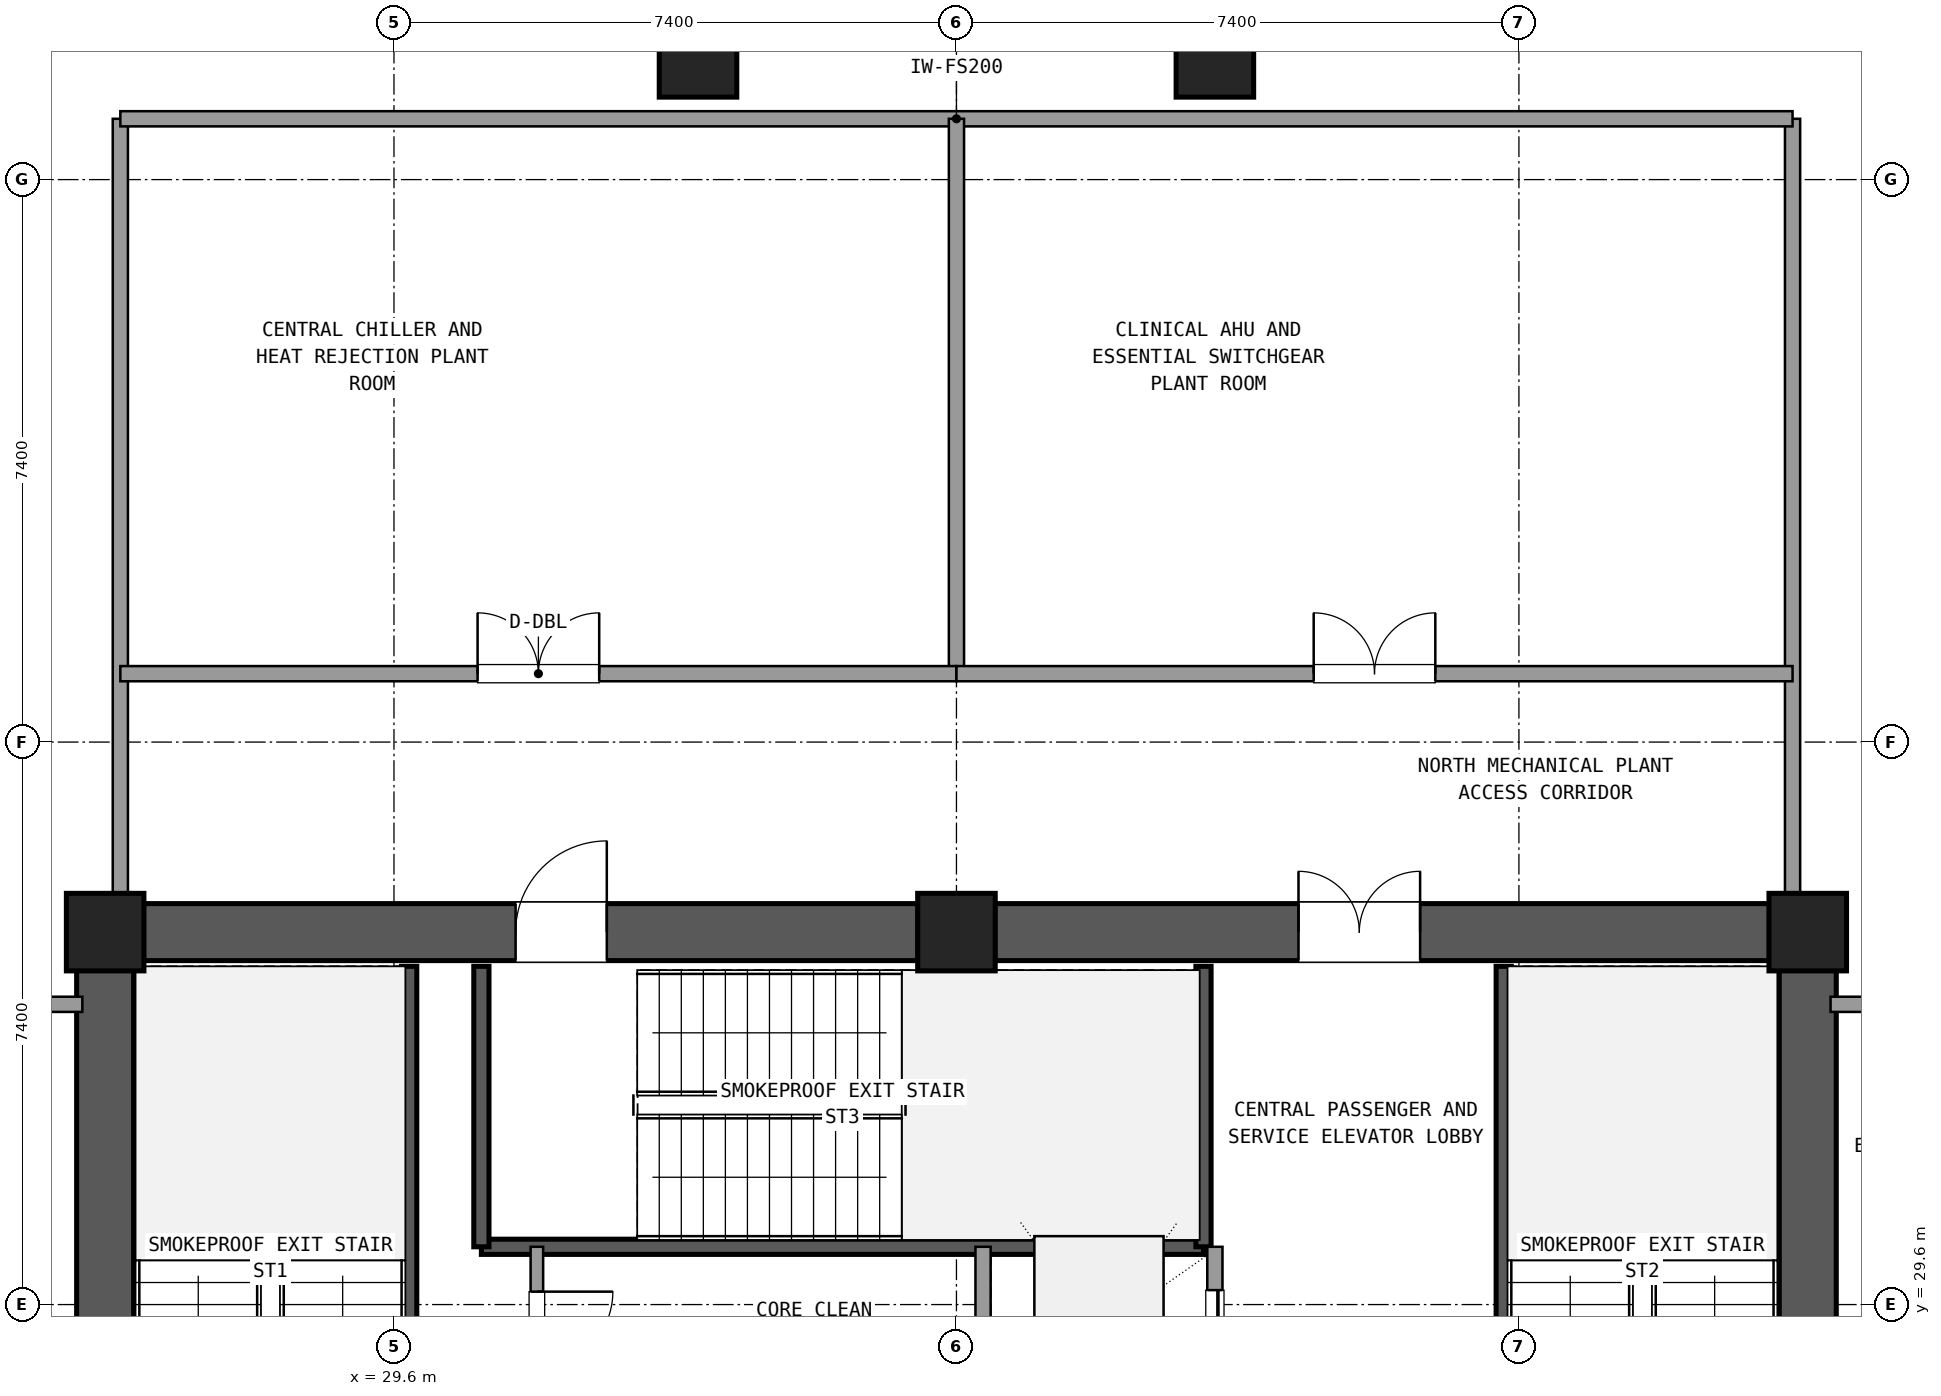
"""IFC4 building model, lengths in metres.
Left out: names, types, materials, properties, quantities, classifications, styles, units other than length and angle.
Written with IfcOpenShell. Run it as: python <this file> out.ifc"""

import sys

from ifc_helpers import new_model, si_unit, direction, frame, frame_2d, origin, origin_2d, place, context, subcontext, project, spatial, rectangle, extrude, element, fill, save


model = new_model("IFC4")
c1 = context("Model", 3, precision=1e-05, world=origin(), true_north=direction((0.0, 1.0)))
c2 = subcontext(c1, "Body", "Model", "MODEL_VIEW")
j1 = project(units=[si_unit("LENGTHUNIT", "METRE"), si_unit("PLANEANGLEUNIT", "RADIAN")], contexts=[c1])
p1 = place(None, origin())
s1 = spatial("IfcSite", under=j1, at=p1, CompositionType="ELEMENT")
p2 = place(p1, origin())
s2 = spatial("IfcBuilding", under=s1, at=p2, CompositionType="ELEMENT")
p3 = place(p2, frame((0.0, 0.0, 124.38)))
s3 = spatial("IfcBuildingStorey", under=s2, at=p3, CompositionType="ELEMENT", Elevation=124.38)
for number, where, z_axis, x_axis in (
    (1, (48.2, 34.5, 0.0), (0.0, 0.0, 1.0), (1.0, 0.0, 0.0)),
    (2, (37.0, 34.5, 0.0), (0.0, 0.0, 1.0), (1.0, 0.0, 0.0)),
    (3, (25.8, 34.5, 0.0), (0.0, 0.0, 1.0), (1.0, 0.0, 0.0)),
):
    element("IfcColumn", number, at=place(p3, frame(where, z_axis=z_axis, x_axis=x_axis)), inside=s3, PredefinedType="COLUMN", context=c2, shape_type="SweptSolid", body=[
        extrude(rectangle(XDim=1.02, YDim=1.02, at=origin_2d()), origin(), (0.0, 0.0, 1.0), 4.68),
    ])
p4 = place(p3, frame((48.2, 26.405, 0.0), z_axis=(0.0, 0.0, 1.0), x_axis=(0.0, 1.0, 0.0)))
e4 = element("IfcWall", 4, at=p4, inside=s3, PredefinedType="SHEAR", context=c2, shape_type="SweptSolid", body=[
    extrude(rectangle(XDim=7.59, YDim=0.75, at=frame_2d((3.795, 0.0))), origin(), (0.0, 0.0, 1.0), 4.38),
])
p5 = place(p3, frame((47.695, 34.5, 0.0), z_axis=(0.0, 0.0, 1.0), x_axis=(-1.0, 0.0, 0.0)))
e5 = element("IfcWall", 5, at=p5, inside=s3, PredefinedType="SHEAR", context=c2, shape_type="SweptSolid", body=[
    extrude(rectangle(XDim=10.19, YDim=0.75, at=frame_2d((5.095, 0.0))), origin(), (0.0, 0.0, 1.0), 4.38),
])
p6 = place(p5, frame((4.595, 0.0, 0.0)))
e6 = element("IfcOpeningElement", 6, at=p6, cuts=e5, PredefinedType="OPENING", context=c2, shape_type="SweptSolid", body=[
    extrude(rectangle(XDim=1.6, YDim=2.2, at=frame_2d((0.8, 1.1))), frame((0.0, 0.385, 0.0), z_axis=(0.0, -1.0, 0.0), x_axis=(1.0, 0.0, 0.0)), (0.0, 0.0, 1.0), 0.77),
])
p7 = place(p3, frame((36.495, 34.5, 0.0), z_axis=(0.0, 0.0, 1.0), x_axis=(-1.0, 0.0, 0.0)))
e7 = element("IfcWall", 7, at=p7, inside=s3, PredefinedType="SHEAR", context=c2, shape_type="SweptSolid", body=[
    extrude(rectangle(XDim=10.19, YDim=0.75, at=frame_2d((5.095, 0.0))), origin(), (0.0, 0.0, 1.0), 4.38),
])
p8 = place(p7, frame((4.095, 0.0, 0.0)))
e8 = element("IfcOpeningElement", 8, at=p8, cuts=e7, PredefinedType="OPENING", context=c2, shape_type="SweptSolid", body=[
    extrude(rectangle(XDim=1.2, YDim=2.15, at=frame_2d((0.6, 1.075))), frame((0.0, 0.385, 0.0), z_axis=(0.0, -1.0, 0.0), x_axis=(1.0, 0.0, 0.0)), (0.0, 0.0, 1.0), 0.77),
])
p9 = place(p3, frame((25.8, 33.995, 0.0), z_axis=(0.0, 0.0, 1.0), x_axis=(0.0, -1.0, 0.0)))
e9 = element("IfcWall", 9, at=p9, inside=s3, PredefinedType="SHEAR", context=c2, shape_type="SweptSolid", body=[
    extrude(rectangle(XDim=7.59, YDim=0.75, at=frame_2d((3.795, 0.0))), origin(), (0.0, 0.0, 1.0), 4.38),
])
for number, where, z_axis, x_axis in (
    (10, (40.4, 45.995, 0.021), (0.0, -0.025, 1.0), (1.0, 0.0, 0.0)),
    (11, (33.6, 45.995, 0.021), (0.0, -0.025, 1.0), (1.0, 0.0, 0.0)),
):
    element("IfcColumn", number, at=place(p3, frame(where, z_axis=z_axis, x_axis=x_axis)), inside=s3, PredefinedType="COLUMN", context=c2, shape_type="SweptSolid", body=[
        extrude(rectangle(XDim=1.02, YDim=1.02, at=origin_2d()), origin(), (0.0, 0.0, 1.0), 4.64),
    ])
for number, where, z_axis, x_axis in (
    (12, (29.8, 24.65, 0.0), (0.0, 0.0, 1.0), (0.0, 1.0, 0.0)),
    (13, (44.2, 24.65, 0.0), (0.0, 0.0, 1.0), (0.0, 1.0, 0.0)),
):
    element("IfcWall", number, at=place(p3, frame(where, z_axis=z_axis, x_axis=x_axis)), inside=s3, PredefinedType="SHEAR", context=c2, shape_type="SweptSolid", body=[
        extrude(rectangle(XDim=9.4, YDim=0.2, at=frame_2d((4.7, 0.0))), origin(), (0.0, 0.0, 1.0), 4.38),
    ])
p10 = place(p3, frame((30.75, 30.36, 0.0), z_axis=(0.0, 0.0, 1.0), x_axis=(1.0, 0.0, 0.0)))
e14 = element("IfcWall", 14, at=p10, inside=s3, PredefinedType="SHEAR", context=c2, shape_type="SweptSolid", body=[
    extrude(rectangle(XDim=9.5, YDim=0.2, at=frame_2d((4.75, 0.0))), origin(), (0.0, 0.0, 1.0), 4.38),
])
for number, where, z_axis, x_axis in (
    (15, (30.75, 30.36, 0.0), (0.0, 0.0, 1.0), (0.0, 1.0, 0.0)),
    (16, (40.25, 30.36, 0.0), (0.0, 0.0, 1.0), (0.0, 1.0, 0.0)),
):
    element("IfcWall", number, at=place(p3, frame(where, z_axis=z_axis, x_axis=x_axis)), inside=s3, PredefinedType="SHEAR", context=c2, shape_type="SweptSolid", body=[
        extrude(rectangle(XDim=3.69, YDim=0.2, at=frame_2d((1.845, 0.0))), origin(), (0.0, 0.0, 1.0), 4.38),
    ])
p11 = place(p3, frame((37.35, 23.54, 0.0), z_axis=(0.0, 0.0, 1.0), x_axis=(0.0, 1.0, 0.0)))
e17 = element("IfcWall", 17, at=p11, inside=s3, PredefinedType="SOLIDWALL", context=c2, shape_type="SweptSolid", body=[
    extrude(rectangle(XDim=6.82, YDim=0.2, at=frame_2d((3.41, 0.0))), origin(), (0.0, 0.0, 1.0), 3.49),
])
p12 = place(p3, frame((40.4, 23.54, 0.0), z_axis=(0.0, 0.0, 1.0), x_axis=(0.0, 1.0, 0.0)))
e18 = element("IfcWall", 18, at=p12, inside=s3, PredefinedType="SOLIDWALL", context=c2, shape_type="SweptSolid", body=[
    extrude(rectangle(XDim=6.82, YDim=0.2, at=frame_2d((3.41, 0.0))), origin(), (0.0, 0.0, 1.0), 3.49),
])
p13 = place(p12, frame((0.35, 0.0, 0.0)))
e19 = element("IfcOpeningElement", 19, at=p13, cuts=e18, PredefinedType="OPENING", context=c2, shape_type="SweptSolid", body=[
    extrude(rectangle(XDim=1.4, YDim=2.2, at=frame_2d((0.7, 1.1))), frame((0.0, 0.11, 0.0), z_axis=(0.0, -1.0, 0.0), x_axis=(1.0, 0.0, 0.0)), (0.0, 0.0, 1.0), 0.22),
])
p14 = place(p12, frame((2.65, 0.0, 0.0)))
e20 = element("IfcOpeningElement", 20, at=p14, cuts=e18, PredefinedType="OPENING", context=c2, shape_type="SweptSolid", body=[
    extrude(rectangle(XDim=1.4, YDim=2.2, at=frame_2d((0.7, 1.1))), frame((0.0, 0.11, 0.0), z_axis=(0.0, -1.0, 0.0), x_axis=(1.0, 0.0, 0.0)), (0.0, 0.0, 1.0), 0.22),
])
p15 = place(p12, frame((4.85, 0.0, 0.0)))
e21 = element("IfcOpeningElement", 21, at=p15, cuts=e18, PredefinedType="OPENING", context=c2, shape_type="SweptSolid", body=[
    extrude(rectangle(XDim=1.4, YDim=2.2, at=frame_2d((0.7, 1.1))), frame((0.0, 0.11, 0.0), z_axis=(0.0, -1.0, 0.0), x_axis=(1.0, 0.0, 0.0)), (0.0, 0.0, 1.0), 0.22),
])
p16 = place(p3, frame((31.48, 26.32, 0.0), z_axis=(0.0, 0.0, 1.0), x_axis=(0.0, 1.0, 0.0)))
e22 = element("IfcWall", 22, at=p16, inside=s3, PredefinedType="PLUMBINGWALL", context=c2, shape_type="SweptSolid", body=[
    extrude(rectangle(XDim=4.04, YDim=0.165, at=frame_2d((2.02, 0.0))), origin(), (0.0, 0.0, 1.0), 3.49),
])
p17 = place(p16, frame((0.5, 0.0, 0.0)))
e23 = element("IfcOpeningElement", 23, at=p17, cuts=e22, PredefinedType="OPENING", context=c2, shape_type="SweptSolid", body=[
    extrude(rectangle(XDim=0.95, YDim=2.1, at=frame_2d((0.475, 1.05))), frame((0.0, 0.093, 0.0), z_axis=(0.0, -1.0, 0.0), x_axis=(1.0, 0.0, 0.0)), (0.0, 0.0, 1.0), 0.185),
])
p18 = place(p16, frame((2.45, 0.0, 0.0)))
e24 = element("IfcOpeningElement", 24, at=p18, cuts=e22, PredefinedType="OPENING", context=c2, shape_type="SweptSolid", body=[
    extrude(rectangle(XDim=1.0, YDim=2.15, at=frame_2d((0.5, 1.075))), frame((0.0, 0.093, 0.0), z_axis=(0.0, -1.0, 0.0), x_axis=(1.0, 0.0, 0.0)), (0.0, 0.0, 1.0), 0.185),
])
for number, where, z_axis, x_axis in (
    (25, (26.0, 34.8, 0.0), (0.0, 0.0, 1.0), (0.0, 1.0, 0.0)),
    (26, (48.0, 34.8, 0.0), (0.0, 0.0, 1.0), (0.0, 1.0, 0.0)),
):
    element("IfcWall", number, at=place(p3, frame(where, z_axis=z_axis, x_axis=x_axis)), inside=s3, PredefinedType="SOLIDWALL", context=c2, shape_type="SweptSolid", body=[
        extrude(rectangle(XDim=10.4, YDim=0.2, at=frame_2d((5.2, 0.0))), origin(), (0.0, 0.0, 1.0), 3.49),
    ])
p19 = place(p3, frame((26.0, 45.2, 0.0), z_axis=(0.0, 0.0, 1.0), x_axis=(1.0, 0.0, 0.0)))
e27 = element("IfcWall", 27, at=p19, inside=s3, PredefinedType="SOLIDWALL", context=c2, shape_type="SweptSolid", body=[
    extrude(rectangle(XDim=22.0, YDim=0.2, at=frame_2d((11.0, 0.0))), origin(), (0.0, 0.0, 1.0), 3.49),
])
p20 = place(p3, frame((37.0, 37.9, 0.0), z_axis=(0.0, 0.0, 1.0), x_axis=(0.0, 1.0, 0.0)))
e28 = element("IfcWall", 28, at=p20, inside=s3, PredefinedType="SOLIDWALL", context=c2, shape_type="SweptSolid", body=[
    extrude(rectangle(XDim=7.3, YDim=0.2, at=frame_2d((3.65, 0.0))), origin(), (0.0, 0.0, 1.0), 3.49),
])
p21 = place(p3, frame((26.0, 37.9, 0.0), z_axis=(0.0, 0.0, 1.0), x_axis=(1.0, 0.0, 0.0)))
e29 = element("IfcWall", 29, at=p21, inside=s3, PredefinedType="SOLIDWALL", context=c2, shape_type="SweptSolid", body=[
    extrude(rectangle(XDim=11.0, YDim=0.2, at=frame_2d((5.5, 0.0))), origin(), (0.0, 0.0, 1.0), 3.49),
])
p22 = place(p21, frame((4.7, 0.0, 0.0)))
e30 = element("IfcOpeningElement", 30, at=p22, cuts=e29, PredefinedType="OPENING", context=c2, shape_type="SweptSolid", body=[
    extrude(rectangle(XDim=1.6, YDim=2.2, at=frame_2d((0.8, 1.1))), frame((0.0, 0.11, 0.0), z_axis=(0.0, -1.0, 0.0), x_axis=(1.0, 0.0, 0.0)), (0.0, 0.0, 1.0), 0.22),
])
p23 = place(p3, frame((37.0, 37.9, 0.0), z_axis=(0.0, 0.0, 1.0), x_axis=(1.0, 0.0, 0.0)))
e31 = element("IfcWall", 31, at=p23, inside=s3, PredefinedType="SOLIDWALL", context=c2, shape_type="SweptSolid", body=[
    extrude(rectangle(XDim=11.0, YDim=0.2, at=frame_2d((5.5, 0.0))), origin(), (0.0, 0.0, 1.0), 3.49),
])
p24 = place(p23, frame((4.7, 0.0, 0.0)))
e32 = element("IfcOpeningElement", 32, at=p24, cuts=e31, PredefinedType="OPENING", context=c2, shape_type="SweptSolid", body=[
    extrude(rectangle(XDim=1.6, YDim=2.2, at=frame_2d((0.8, 1.1))), frame((0.0, 0.11, 0.0), z_axis=(0.0, -1.0, 0.0), x_axis=(1.0, 0.0, 0.0)), (0.0, 0.0, 1.0), 0.22),
])
for number, where, z_axis, x_axis in (
    (33, (16.4, 33.55, 0.0), (0.0, 0.0, 1.0), (1.0, 0.0, 0.0)),
    (34, (48.5, 33.55, 0.0), (0.0, 0.0, 1.0), (1.0, 0.0, 0.0)),
):
    element("IfcWall", number, at=place(p3, frame(where, z_axis=z_axis, x_axis=x_axis)), inside=s3, PredefinedType="SOLIDWALL", context=c2, shape_type="SweptSolid", body=[
        extrude(rectangle(XDim=9.1, YDim=0.2, at=frame_2d((4.55, 0.0))), origin(), (0.0, 0.0, 1.0), 3.49),
    ])
p25 = place(p6, frame((1.6, 0.0, 0.0), z_axis=(0.0, 0.0, 1.0), x_axis=(-1.0, 0.0, 0.0)))
e35 = element("IfcDoor", 35, at=p25, inside=s3, OperationType="DOUBLE_DOOR_SINGLE_SWING", PredefinedType="DOOR", context=c2, shape_type="SweptSolid", body=[
    extrude(rectangle(XDim=1.6, YDim=2.2, at=frame_2d((0.8, 1.1))), frame((0.0, 0.025, 0.0), z_axis=(0.0, -1.0, 0.0), x_axis=(1.0, 0.0, 0.0)), (0.0, 0.0, 1.0), 0.05),
])
fill(e6, e35)
p26 = place(p8, frame((1.2, 0.0, 0.0), z_axis=(0.0, 0.0, 1.0), x_axis=(-1.0, 0.0, 0.0)))
e36 = element("IfcDoor", 36, at=p26, inside=s3, OperationType="SINGLE_SWING_LEFT", PredefinedType="DOOR", context=c2, shape_type="SweptSolid", body=[
    extrude(rectangle(XDim=1.2, YDim=2.15, at=frame_2d((0.6, 1.075))), frame((0.0, 0.025, 0.0), z_axis=(0.0, -1.0, 0.0), x_axis=(1.0, 0.0, 0.0)), (0.0, 0.0, 1.0), 0.05),
])
fill(e8, e36)
p27 = place(p15, origin())
e37 = element("IfcDoor", 37, at=p27, inside=s3, OperationType="SLIDING_TO_RIGHT", PredefinedType="DOOR", context=c2, shape_type="SweptSolid", body=[
    extrude(rectangle(XDim=1.4, YDim=2.2, at=frame_2d((0.7, 1.1))), frame((0.0, 0.025, 0.0), z_axis=(0.0, -1.0, 0.0), x_axis=(1.0, 0.0, 0.0)), (0.0, 0.0, 1.0), 0.05),
])
fill(e21, e37)
p28 = place(p18, frame((1.0, 0.0, 0.0), z_axis=(0.0, 0.0, 1.0), x_axis=(-1.0, 0.0, 0.0)))
e38 = element("IfcDoor", 38, at=p28, inside=s3, OperationType="SINGLE_SWING_RIGHT", PredefinedType="DOOR", context=c2, shape_type="SweptSolid", body=[
    extrude(rectangle(XDim=1.0, YDim=2.15, at=frame_2d((0.5, 1.075))), frame((0.0, 0.025, 0.0), z_axis=(0.0, -1.0, 0.0), x_axis=(1.0, 0.0, 0.0)), (0.0, 0.0, 1.0), 0.05),
])
fill(e24, e38)
p29 = place(p22, origin())
e39 = element("IfcDoor", 39, at=p29, inside=s3, OperationType="DOUBLE_DOOR_SINGLE_SWING", PredefinedType="DOOR", context=c2, shape_type="SweptSolid", body=[
    extrude(rectangle(XDim=1.6, YDim=2.2, at=frame_2d((0.8, 1.1))), frame((0.0, 0.025, 0.0), z_axis=(0.0, -1.0, 0.0), x_axis=(1.0, 0.0, 0.0)), (0.0, 0.0, 1.0), 0.05),
])
fill(e30, e39)
p30 = place(p24, origin())
e40 = element("IfcDoor", 40, at=p30, inside=s3, OperationType="DOUBLE_DOOR_SINGLE_SWING", PredefinedType="DOOR", context=c2, shape_type="SweptSolid", body=[
    extrude(rectangle(XDim=1.6, YDim=2.2, at=frame_2d((0.8, 1.1))), frame((0.0, 0.025, 0.0), z_axis=(0.0, -1.0, 0.0), x_axis=(1.0, 0.0, 0.0)), (0.0, 0.0, 1.0), 0.05),
])
fill(e32, e40)
save(model, sys.argv[1])
